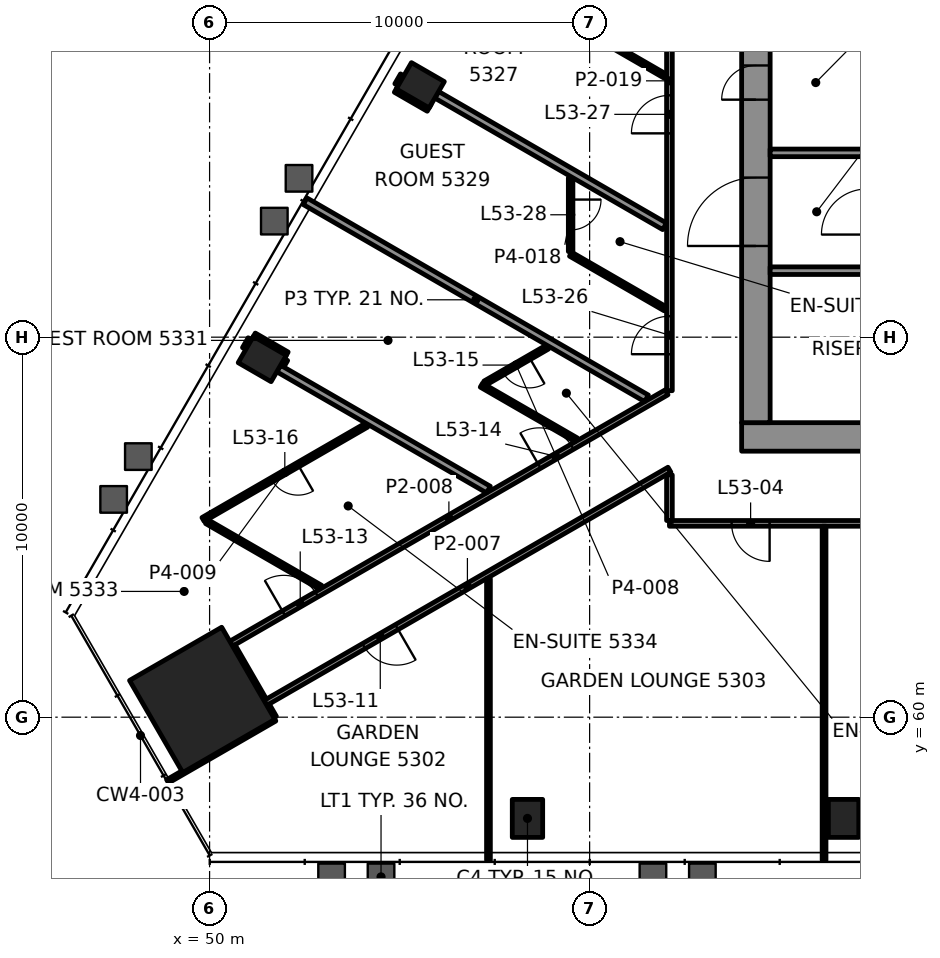
"""IFC4 building model, lengths in metres.
Left out: names, types, materials, properties, quantities, classifications, styles, units other than length and angle.
Written with IfcOpenShell. Run it as: python <this file> out.ifc"""

import sys

from ifc_helpers import new_model, si_unit, direction, frame, frame_2d, origin, origin_2d, place, context, subcontext, project, spatial, rectangle, hollow_rectangle, extrude, element, fill, save


model = new_model("IFC4")
c1 = context("Model", 3, precision=1e-05, world=origin(), true_north=direction((0.0, 1.0)))
c2 = subcontext(c1, "Body", "Model", "MODEL_VIEW")
j1 = project(units=[si_unit("LENGTHUNIT", "METRE"), si_unit("PLANEANGLEUNIT", "RADIAN")], contexts=[c1])
p1 = place(None, origin())
s1 = spatial("IfcSite", under=j1, at=p1, CompositionType="ELEMENT")
p2 = place(p1, origin())
s2 = spatial("IfcBuilding", under=s1, at=p2, CompositionType="ELEMENT")
p3 = place(p2, frame((0.0, 0.0, 226.0)))
s3 = spatial("IfcBuildingStorey", under=s2, at=p3, CompositionType="ELEMENT", Elevation=226.0)
p4 = place(p3, frame((49.806, 60.454, 0.0), z_axis=(0.0, 0.0, 1.0), x_axis=(0.5, -0.866025403784, 0.0)))
e1 = element("IfcColumn", 1, at=p4, inside=s3, PredefinedType="COLUMN", context=c2, shape_type="SweptSolid", body=[
    extrude(rectangle(XDim=2.8, YDim=2.8, at=origin_2d()), origin(), (0.0, 0.0, 1.0), 3.9),
])
for number, where, z_axis, x_axis in (
    (2, (58.365, 57.337, -0.0), (0.0, 0.0, 1.0), (1.0, 0.0, 0.0)),
    (3, (66.682, 57.337, -0.0), (0.0, 0.0, 1.0), (1.0, 0.0, 0.0)),
    (4, (55.544, 76.628, -0.0), (0.0, 0.0, 1.0), (-0.5, -0.866, 0.0)),
    (5, (51.385, 69.425, -0.0), (0.0, 0.0, 1.0), (-0.5, -0.866, 0.0)),
):
    element("IfcColumn", number, at=place(p3, frame(where, z_axis=z_axis, x_axis=x_axis)), inside=s3, PredefinedType="COLUMN", context=c2, shape_type="SweptSolid", body=[
        extrude(hollow_rectangle(XDim=0.8, YDim=1.0, WallThickness=0.05, at=origin_2d()), origin(), (0.0, 0.0, 1.0), 3.9),
    ])
p5 = place(p3, frame((64.0, 67.375, 0.0), z_axis=(0.0, 0.0, 1.0), x_axis=(1.0, 0.0, 0.0)))
e6 = element("IfcWall", 6, at=p5, inside=s3, PredefinedType="SHEAR", context=c2, shape_type="SweptSolid", body=[
    extrude(rectangle(XDim=22.0, YDim=0.75, at=frame_2d((11.0, 0.0))), origin(), (0.0, 0.0, 1.0), 3.7),
])
p6 = place(p5, frame((3.15, 0.0, 0.0)))
e7 = element("IfcOpeningElement", 7, at=p6, cuts=e6, PredefinedType="OPENING", context=c2, shape_type="SweptSolid", body=[
    extrude(rectangle(XDim=0.9, YDim=2.1, at=frame_2d((0.45, 1.05))), frame((0.0, 0.385, 0.0), z_axis=(0.0, -1.0, 0.0), x_axis=(1.0, 0.0, 0.0)), (0.0, 0.0, 1.0), 0.77),
])
p7 = place(p3, frame((64.375, 67.75, 0.0), z_axis=(0.0, 0.0, 1.0), x_axis=(0.0, 1.0, 0.0)))
e8 = element("IfcWall", 8, at=p7, inside=s3, PredefinedType="SHEAR", context=c2, shape_type="SweptSolid", body=[
    extrude(rectangle(XDim=14.5, YDim=0.75, at=frame_2d((7.25, 0.0))), origin(), (0.0, 0.0, 1.0), 3.7),
])
p8 = place(p7, frame((4.65, 0.0, 0.0)))
e9 = element("IfcOpeningElement", 9, at=p8, cuts=e8, PredefinedType="OPENING", context=c2, shape_type="SweptSolid", body=[
    extrude(rectangle(XDim=1.8, YDim=2.1, at=frame_2d((0.9, 1.05))), frame((0.0, 0.385, 0.0), z_axis=(0.0, -1.0, 0.0), x_axis=(1.0, 0.0, 0.0)), (0.0, 0.0, 1.0), 0.77),
])
p9 = place(p7, frame((8.5, 0.0, 0.0)))
e10 = element("IfcOpeningElement", 10, at=p9, cuts=e8, PredefinedType="OPENING", context=c2, shape_type="SweptSolid", body=[
    extrude(rectangle(XDim=0.9, YDim=2.1, at=frame_2d((0.45, 1.05))), frame((0.0, 0.385, 0.0), z_axis=(0.0, -1.0, 0.0), x_axis=(1.0, 0.0, 0.0)), (0.0, 0.0, 1.0), 0.77),
])
p10 = place(p7, frame((12.2, 0.0, 0.0)))
e11 = element("IfcOpeningElement", 11, at=p10, cuts=e8, PredefinedType="OPENING", context=c2, shape_type="SweptSolid", body=[
    extrude(rectangle(XDim=0.9, YDim=2.1, at=frame_2d((0.45, 1.05))), frame((0.0, 0.385, 0.0), z_axis=(0.0, -1.0, 0.0), x_axis=(1.0, 0.0, 0.0)), (0.0, 0.0, 1.0), 0.77),
])
p11 = place(p3, frame((87.899, 65.1, 0.0), z_axis=(0.0, 0.0, 1.0), x_axis=(-1.0, 0.0, 0.0)))
e12 = element("IfcWall", 12, at=p11, inside=s3, PredefinedType="PARTITIONING", context=c2, shape_type="SweptSolid", body=[
    extrude(rectangle(XDim=25.799, YDim=0.15, at=frame_2d((12.899, 0.0))), origin(), (0.0, 0.0, 1.0), 3.1),
])
p12 = place(p11, frame((1.636, 0.0, 0.0)))
e13 = element("IfcOpeningElement", 13, at=p12, cuts=e12, PredefinedType="OPENING", context=c2, shape_type="SweptSolid", body=[
    extrude(rectangle(XDim=1.0, YDim=2.1, at=frame_2d((0.5, 1.05))), frame((0.0, 0.085, 0.0), z_axis=(0.0, -1.0, 0.0), x_axis=(1.0, 0.0, 0.0)), (0.0, 0.0, 1.0), 0.17),
])
p13 = place(p11, frame((7.984, 0.0, 0.0)))
e14 = element("IfcOpeningElement", 14, at=p13, cuts=e12, PredefinedType="OPENING", context=c2, shape_type="SweptSolid", body=[
    extrude(rectangle(XDim=1.0, YDim=2.1, at=frame_2d((0.5, 1.05))), frame((0.0, 0.085, 0.0), z_axis=(0.0, -1.0, 0.0), x_axis=(1.0, 0.0, 0.0)), (0.0, 0.0, 1.0), 0.17),
])
p14 = place(p11, frame((16.815, 0.0, 0.0)))
e15 = element("IfcOpeningElement", 15, at=p14, cuts=e12, PredefinedType="OPENING", context=c2, shape_type="SweptSolid", body=[
    extrude(rectangle(XDim=1.0, YDim=2.1, at=frame_2d((0.5, 1.05))), frame((0.0, 0.085, 0.0), z_axis=(0.0, -1.0, 0.0), x_axis=(1.0, 0.0, 0.0)), (0.0, 0.0, 1.0), 0.17),
])
p15 = place(p11, frame((23.163, 0.0, 0.0)))
e16 = element("IfcOpeningElement", 16, at=p15, cuts=e12, PredefinedType="OPENING", context=c2, shape_type="SweptSolid", body=[
    extrude(rectangle(XDim=1.0, YDim=2.1, at=frame_2d((0.5, 1.05))), frame((0.0, 0.085, 0.0), z_axis=(0.0, -1.0, 0.0), x_axis=(1.0, 0.0, 0.0)), (0.0, 0.0, 1.0), 0.17),
])
p16 = place(p3, frame((48.895, 58.312, 0.0), z_axis=(0.0, 0.0, 1.0), x_axis=(0.866035906198, 0.499981808845, 0.0)))
e17 = element("IfcWall", 17, at=p16, inside=s3, PredefinedType="PARTITIONING", context=c2, shape_type="SweptSolid", body=[
    extrude(rectangle(XDim=3.259, YDim=0.1, at=frame_2d((1.63, 0.0))), origin(), (0.0, 0.0, 1.0), 3.1),
])
p17 = place(p3, frame((62.1, 66.513, 0.0), z_axis=(0.0, 0.0, 1.0), x_axis=(-0.866027942666, -0.499995602502, 0.0)))
e18 = element("IfcWall", 18, at=p17, inside=s3, PredefinedType="PARTITIONING", context=c2, shape_type="SweptSolid", body=[
    extrude(rectangle(XDim=12.276, YDim=0.15, at=frame_2d((6.138, 0.0))), origin(), (0.0, 0.0, 1.0), 2.947),
])
p18 = place(p17, frame((8.286, 0.0, 0.0)))
e19 = element("IfcOpeningElement", 19, at=p18, cuts=e18, PredefinedType="OPENING", context=c2, shape_type="SweptSolid", body=[
    extrude(rectangle(XDim=1.0, YDim=2.1, at=frame_2d((0.5, 1.05))), frame((0.0, 0.085, 0.0), z_axis=(0.0, -1.0, 0.0), x_axis=(1.0, 0.0, 0.0)), (0.0, 0.0, 1.0), 0.17),
])
p19 = place(p3, frame((50.569, 61.934, 0.0), z_axis=(0.0, 0.0, 1.0), x_axis=(0.866030071145, 0.499991915808, 0.0)))
e20 = element("IfcWall", 20, at=p19, inside=s3, PredefinedType="PARTITIONING", context=c2, shape_type="SweptSolid", body=[
    extrude(rectangle(XDim=13.228, YDim=0.15, at=frame_2d((6.614, 0.0))), origin(), (0.0, 0.0, 1.0), 3.1),
])
p20 = place(p19, frame((1.597, 0.0, 0.0)))
e21 = element("IfcOpeningElement", 21, at=p20, cuts=e20, PredefinedType="OPENING", context=c2, shape_type="SweptSolid", body=[
    extrude(rectangle(XDim=1.0, YDim=2.1, at=frame_2d((0.5, 1.05))), frame((0.0, 0.085, 0.0), z_axis=(0.0, -1.0, 0.0), x_axis=(1.0, 0.0, 0.0)), (0.0, 0.0, 1.0), 0.17),
])
p21 = place(p19, frame((9.36, 0.0, 0.0)))
e22 = element("IfcOpeningElement", 22, at=p21, cuts=e20, PredefinedType="OPENING", context=c2, shape_type="SweptSolid", body=[
    extrude(rectangle(XDim=1.0, YDim=2.1, at=frame_2d((0.5, 1.05))), frame((0.0, 0.085, 0.0), z_axis=(0.0, -1.0, 0.0), x_axis=(1.0, 0.0, 0.0)), (0.0, 0.0, 1.0), 0.17),
])
p22 = place(p3, frame((58.889, 69.74, 0.0), z_axis=(0.0, 0.0, 1.0), x_axis=(-0.866039783157, -0.499975093369, 0.0)))
e23 = element("IfcWall", 23, at=p22, inside=s3, PredefinedType="PARTITIONING", context=c2, shape_type="SweptSolid", body=[
    extrude(rectangle(XDim=1.896, YDim=0.12, at=frame_2d((0.948, 0.0))), origin(), (0.0, 0.0, 1.0), 3.1),
])
p23 = place(p22, frame((0.548, 0.0, 0.0)))
e24 = element("IfcOpeningElement", 24, at=p23, cuts=e23, PredefinedType="OPENING", context=c2, shape_type="SweptSolid", body=[
    extrude(rectangle(XDim=0.8, YDim=2.1, at=frame_2d((0.4, 1.05))), frame((0.0, 0.07, 0.0), z_axis=(0.0, -1.0, 0.0), x_axis=(1.0, 0.0, 0.0)), (0.0, 0.0, 1.0), 0.14),
])
p24 = place(p3, frame((54.13, 67.685, 0.0), z_axis=(0.0, 0.0, 1.0), x_axis=(-0.866020232408, -0.500008956979, 0.0)))
e25 = element("IfcWall", 25, at=p24, inside=s3, PredefinedType="PARTITIONING", context=c2, shape_type="SweptSolid", body=[
    extrude(rectangle(XDim=4.967, YDim=0.12, at=frame_2d((2.483, 0.0))), origin(), (0.0, 0.0, 1.0), 3.1),
])
p25 = place(p24, frame((2.083, 0.0, 0.0)))
e26 = element("IfcOpeningElement", 26, at=p25, cuts=e25, PredefinedType="OPENING", context=c2, shape_type="SweptSolid", body=[
    extrude(rectangle(XDim=0.8, YDim=2.1, at=frame_2d((0.4, 1.05))), frame((0.0, 0.07, 0.0), z_axis=(0.0, -1.0, 0.0), x_axis=(1.0, 0.0, 0.0)), (0.0, 0.0, 1.0), 0.14),
])
p26 = place(p3, frame((51.868, 69.262, 0.0), z_axis=(0.0, 0.0, 1.0), x_axis=(0.500359323436, 0.865817848887, 0.0)))
e27 = element("IfcWall", 27, at=p26, inside=s3, PredefinedType="PARTITIONING", context=c2, shape_type="SweptSolid", body=[
    extrude(rectangle(XDim=0.199, YDim=0.2, at=frame_2d((0.1, 0.0))), origin(), (0.0, 0.0, 1.0), 3.1),
])
p27 = place(p3, frame((50.952, 69.676, 0.0), z_axis=(0.0, 0.0, 1.0), x_axis=(0.500264001326, 0.865872928886, 0.0)))
e28 = element("IfcWall", 28, at=p27, inside=s3, PredefinedType="PARTITIONING", context=c2, shape_type="SweptSolid", body=[
    extrude(rectangle(XDim=0.299, YDim=0.2, at=frame_2d((0.149, 0.0))), origin(), (0.0, 0.0, 1.0), 3.1),
])
p28 = place(p3, frame((54.961, 76.619, 0.0), z_axis=(0.0, 0.0, 1.0), x_axis=(0.500426713919, 0.865778900179, 0.0)))
e29 = element("IfcWall", 29, at=p28, inside=s3, PredefinedType="PARTITIONING", context=c2, shape_type="SweptSolid", body=[
    extrude(rectangle(XDim=0.3, YDim=0.2, at=frame_2d((0.15, 0.0))), origin(), (0.0, 0.0, 1.0), 3.1),
])
p29 = place(p3, frame((66.169, 56.237, 0.0), z_axis=(0.0, 0.0, 1.0), x_axis=(0.0, 1.0, 0.0)))
e30 = element("IfcWall", 30, at=p29, inside=s3, PredefinedType="PARTITIONING", context=c2, shape_type="SweptSolid", body=[
    extrude(rectangle(XDim=8.788, YDim=0.1, at=frame_2d((4.394, 0.0))), origin(), (0.0, 0.0, 1.0), 3.022),
])
p30 = place(p3, frame((62.1, 65.176, 0.0), z_axis=(0.0, 0.0, 1.0), x_axis=(0.0, 1.0, 0.0)))
e31 = element("IfcWall", 31, at=p30, inside=s3, PredefinedType="PARTITIONING", context=c2, shape_type="SweptSolid", body=[
    extrude(rectangle(XDim=1.201, YDim=0.15, at=frame_2d((0.6, 0.0))), origin(), (0.0, 0.0, 1.0), 2.947),
])
p31 = place(p3, frame((62.1, 68.591, 0.0), z_axis=(0.0, 0.0, 1.0), x_axis=(0.0, 1.0, 0.0)))
e32 = element("IfcWall", 32, at=p31, inside=s3, PredefinedType="PARTITIONING", context=c2, shape_type="SweptSolid", body=[
    extrude(rectangle(XDim=16.308, YDim=0.15, at=frame_2d((8.154, 0.0))), origin(), (0.0, 0.0, 1.0), 3.1),
])
p32 = place(p31, frame((0.96, 0.0, 0.0)))
e33 = element("IfcOpeningElement", 33, at=p32, cuts=e32, PredefinedType="OPENING", context=c2, shape_type="SweptSolid", body=[
    extrude(rectangle(XDim=1.0, YDim=2.1, at=frame_2d((0.5, 1.05))), frame((0.0, 0.085, 0.0), z_axis=(0.0, -1.0, 0.0), x_axis=(1.0, 0.0, 0.0)), (0.0, 0.0, 1.0), 0.17),
])
p33 = place(p31, frame((6.772, 0.0, 0.0)))
e34 = element("IfcOpeningElement", 34, at=p33, cuts=e32, PredefinedType="OPENING", context=c2, shape_type="SweptSolid", body=[
    extrude(rectangle(XDim=1.0, YDim=2.1, at=frame_2d((0.5, 1.05))), frame((0.0, 0.085, 0.0), z_axis=(0.0, -1.0, 0.0), x_axis=(1.0, 0.0, 0.0)), (0.0, 0.0, 1.0), 0.17),
])
p34 = place(p3, frame((59.5, 74.189, 0.0), z_axis=(0.0, 0.0, 1.0), x_axis=(0.0, -1.0, 0.0)))
e35 = element("IfcWall", 35, at=p34, inside=s3, PredefinedType="PARTITIONING", context=c2, shape_type="SweptSolid", body=[
    extrude(rectangle(XDim=1.936, YDim=0.12, at=frame_2d((0.968, 0.0))), origin(), (0.0, 0.0, 1.0), 3.1),
])
p35 = place(p34, frame((0.568, 0.0, 0.0)))
e36 = element("IfcOpeningElement", 36, at=p35, cuts=e35, PredefinedType="OPENING", context=c2, shape_type="SweptSolid", body=[
    extrude(rectangle(XDim=0.8, YDim=2.1, at=frame_2d((0.4, 1.05))), frame((0.0, 0.07, 0.0), z_axis=(0.0, -1.0, 0.0), x_axis=(1.0, 0.0, 0.0)), (0.0, 0.0, 1.0), 0.14),
])
p36 = place(p3, frame((57.338, 56.237, 0.0), z_axis=(0.0, 0.0, 1.0), x_axis=(0.0, 1.0, 0.0)))
e37 = element("IfcWall", 37, at=p36, inside=s3, PredefinedType="PARTITIONING", context=c2, shape_type="SweptSolid", body=[
    extrude(rectangle(XDim=7.41, YDim=0.1, at=frame_2d((3.705, 0.0))), origin(), (0.0, 0.0, 1.0), 3.1),
])
p37 = place(p3, frame((51.693, 59.985, 0.0), z_axis=(0.0, 0.0, 1.0), x_axis=(-0.499854089722, 0.866109628736, 0.0)))
e38 = element("IfcWall", 38, at=p37, inside=s3, PredefinedType="PARTITIONING", context=c2, shape_type="SweptSolid", body=[
    extrude(rectangle(XDim=0.375, YDim=0.15, at=frame_2d((0.187, 0.0))), origin(), (0.0, 0.0, 1.0), 3.1),
])
p38 = place(p3, frame((61.99, 76.868, 0.0), z_axis=(0.0, 0.0, 1.0), x_axis=(-0.866028357664, 0.499994883695, 0.0)))
e39 = element("IfcWall", 39, at=p38, inside=s3, PredefinedType="PARTITIONING", context=c2, shape_type="SweptSolid", body=[
    extrude(rectangle(XDim=3.568, YDim=0.12, at=frame_2d((1.784, 0.0))), origin(), (0.0, 0.0, 1.0), 3.1),
])
p39 = place(p3, frame((61.973, 72.917, 0.0), z_axis=(0.0, 0.0, 1.0), x_axis=(-0.866027621823, 0.499996158224, 0.0)))
e40 = element("IfcWall", 40, at=p39, inside=s3, PredefinedType="PARTITIONING", context=c2, shape_type="SweptSolid", body=[
    extrude(rectangle(XDim=6.923, YDim=0.2, at=frame_2d((3.462, 0.0))), origin(), (0.0, 0.0, 1.0), 3.1),
])
p40 = place(p3, frame((55.777, 76.032, 0.0), z_axis=(0.0, 0.0, 1.0), x_axis=(-0.866010750942, 0.50002537861, 0.0)))
e41 = element("IfcWall", 41, at=p40, inside=s3, PredefinedType="PARTITIONING", context=c2, shape_type="SweptSolid", body=[
    extrude(rectangle(XDim=1.0, YDim=0.2, at=frame_2d((0.5, 0.0))), origin(), (0.0, 0.0, 1.0), 3.022),
])
p41 = place(p3, frame((61.99, 70.746, 0.0), z_axis=(0.0, 0.0, 1.0), x_axis=(-0.86600886466, 0.50002864551, 0.0)))
e42 = element("IfcWall", 42, at=p41, inside=s3, PredefinedType="PARTITIONING", context=c2, shape_type="SweptSolid", body=[
    extrude(rectangle(XDim=2.876, YDim=0.12, at=frame_2d((1.438, 0.0))), origin(), (0.0, 0.0, 1.0), 3.1),
])
p42 = place(p3, frame((61.497, 68.39, 0.0), z_axis=(0.0, 0.0, 1.0), x_axis=(-0.866030396021, 0.499991353094, 0.0)))
e43 = element("IfcWall", 43, at=p42, inside=s3, PredefinedType="PARTITIONING", context=c2, shape_type="SweptSolid", body=[
    extrude(rectangle(XDim=10.374, YDim=0.2, at=frame_2d((5.187, 0.0))), origin(), (0.0, 0.0, 1.0), 3.022),
])
p43 = place(p3, frame((59.643, 67.299, 0.0), z_axis=(0.0, 0.0, 1.0), x_axis=(-0.86600886466, 0.50002864551, 0.0)))
e44 = element("IfcWall", 44, at=p43, inside=s3, PredefinedType="PARTITIONING", context=c2, shape_type="SweptSolid", body=[
    extrude(rectangle(XDim=2.876, YDim=0.12, at=frame_2d((1.438, 0.0))), origin(), (0.0, 0.0, 1.0), 3.1),
])
p44 = place(p3, frame((52.018, 69.522, 0.0), z_axis=(0.0, 0.0, 1.0), x_axis=(-0.86597798544, 0.50008212199, 0.0)))
e45 = element("IfcWall", 45, at=p44, inside=s3, PredefinedType="PARTITIONING", context=c2, shape_type="SweptSolid", body=[
    extrude(rectangle(XDim=0.999, YDim=0.2, at=frame_2d((0.5, 0.0))), origin(), (0.0, 0.0, 1.0), 3.022),
])
p45 = place(p3, frame((57.338, 65.989, 0.0), z_axis=(0.0, 0.0, 1.0), x_axis=(-0.866008861407, 0.500028651143, 0.0)))
e46 = element("IfcWall", 46, at=p45, inside=s3, PredefinedType="PARTITIONING", context=c2, shape_type="SweptSolid", body=[
    extrude(rectangle(XDim=6.373, YDim=0.2, at=frame_2d((3.187, 0.0))), origin(), (0.0, 0.0, 1.0), 3.1),
])
p46 = place(p3, frame((52.919, 63.418, 0.0), z_axis=(0.0, 0.0, 1.0), x_axis=(-0.866045730533, 0.499964791386, 0.0)))
e47 = element("IfcWall", 47, at=p46, inside=s3, PredefinedType="PARTITIONING", context=c2, shape_type="SweptSolid", body=[
    extrude(rectangle(XDim=3.459, YDim=0.12, at=frame_2d((1.729, 0.0))), origin(), (0.0, 0.0, 1.0), 3.1),
])
p47 = place(p3, frame((51.431, 60.44, 0.0), z_axis=(0.0, 0.0, 1.0), x_axis=(-0.499991515992, 0.866030301974, 0.0)))
e48 = element("IfcWall", 48, at=p47, inside=s3, PredefinedType="PARTITIONING", context=c2, shape_type="SweptSolid", body=[
    extrude(rectangle(XDim=1.649, YDim=0.15, at=frame_2d((0.825, 0.0))), origin(), (0.0, 0.0, 1.0), 2.947),
])
p48 = place(p3, frame((64.75, 71.75, 0.0), z_axis=(0.0, 0.0, 1.0), x_axis=(1.0, 0.0, 0.0)))
e49 = element("IfcWall", 49, at=p48, inside=s3, PredefinedType="PARTITIONING", context=c2, shape_type="SweptSolid", body=[
    extrude(rectangle(XDim=5.55, YDim=0.2, at=frame_2d((2.775, 0.0))), origin(), (0.0, 0.0, 1.0), 3.7),
])
p49 = place(p3, frame((64.75, 74.85, 0.0), z_axis=(0.0, 0.0, 1.0), x_axis=(1.0, 0.0, 0.0)))
e50 = element("IfcWall", 50, at=p49, inside=s3, PredefinedType="PARTITIONING", context=c2, shape_type="SweptSolid", body=[
    extrude(rectangle(XDim=2.45, YDim=0.2, at=frame_2d((1.225, 0.0))), origin(), (0.0, 0.0, 1.0), 3.7),
])
p50 = place(p15, origin())
e51 = element("IfcDoor", 51, at=p50, inside=s3, OperationType="SINGLE_SWING_LEFT", PredefinedType="DOOR", context=c2, shape_type="SweptSolid", body=[
    extrude(rectangle(XDim=1.0, YDim=2.1, at=frame_2d((0.5, 1.05))), frame((0.0, 0.025, 0.0), z_axis=(0.0, -1.0, 0.0), x_axis=(1.0, 0.0, 0.0)), (0.0, 0.0, 1.0), 0.05),
])
fill(e16, e51)
p51 = place(p18, origin())
e52 = element("IfcDoor", 52, at=p51, inside=s3, OperationType="SINGLE_SWING_RIGHT", PredefinedType="DOOR", context=c2, shape_type="SweptSolid", body=[
    extrude(rectangle(XDim=1.0, YDim=2.1, at=frame_2d((0.5, 1.05))), frame((0.0, 0.025, 0.0), z_axis=(0.0, -1.0, 0.0), x_axis=(1.0, 0.0, 0.0)), (0.0, 0.0, 1.0), 0.05),
])
fill(e19, e52)
p52 = place(p20, origin())
e53 = element("IfcDoor", 53, at=p52, inside=s3, OperationType="SINGLE_SWING_RIGHT", PredefinedType="DOOR", context=c2, shape_type="SweptSolid", body=[
    extrude(rectangle(XDim=1.0, YDim=2.1, at=frame_2d((0.5, 1.05))), frame((0.0, 0.025, 0.0), z_axis=(0.0, -1.0, 0.0), x_axis=(1.0, 0.0, 0.0)), (0.0, 0.0, 1.0), 0.05),
])
fill(e21, e53)
p53 = place(p21, origin())
e54 = element("IfcDoor", 54, at=p53, inside=s3, OperationType="SINGLE_SWING_RIGHT", PredefinedType="DOOR", context=c2, shape_type="SweptSolid", body=[
    extrude(rectangle(XDim=1.0, YDim=2.1, at=frame_2d((0.5, 1.05))), frame((0.0, 0.025, 0.0), z_axis=(0.0, -1.0, 0.0), x_axis=(1.0, 0.0, 0.0)), (0.0, 0.0, 1.0), 0.05),
])
fill(e22, e54)
p54 = place(p23, origin())
e55 = element("IfcDoor", 55, at=p54, inside=s3, OperationType="SINGLE_SWING_RIGHT", PredefinedType="DOOR", context=c2, shape_type="SweptSolid", body=[
    extrude(rectangle(XDim=0.8, YDim=2.1, at=frame_2d((0.4, 1.05))), frame((0.0, 0.025, 0.0), z_axis=(0.0, -1.0, 0.0), x_axis=(1.0, 0.0, 0.0)), (0.0, 0.0, 1.0), 0.05),
])
fill(e24, e55)
p55 = place(p25, origin())
e56 = element("IfcDoor", 56, at=p55, inside=s3, OperationType="SINGLE_SWING_RIGHT", PredefinedType="DOOR", context=c2, shape_type="SweptSolid", body=[
    extrude(rectangle(XDim=0.8, YDim=2.1, at=frame_2d((0.4, 1.05))), frame((0.0, 0.025, 0.0), z_axis=(0.0, -1.0, 0.0), x_axis=(1.0, 0.0, 0.0)), (0.0, 0.0, 1.0), 0.05),
])
fill(e26, e56)
p56 = place(p32, origin())
e57 = element("IfcDoor", 57, at=p56, inside=s3, OperationType="SINGLE_SWING_RIGHT", PredefinedType="DOOR", context=c2, shape_type="SweptSolid", body=[
    extrude(rectangle(XDim=1.0, YDim=2.1, at=frame_2d((0.5, 1.05))), frame((0.0, 0.025, 0.0), z_axis=(0.0, -1.0, 0.0), x_axis=(1.0, 0.0, 0.0)), (0.0, 0.0, 1.0), 0.05),
])
fill(e33, e57)
p57 = place(p33, origin())
e58 = element("IfcDoor", 58, at=p57, inside=s3, OperationType="SINGLE_SWING_RIGHT", PredefinedType="DOOR", context=c2, shape_type="SweptSolid", body=[
    extrude(rectangle(XDim=1.0, YDim=2.1, at=frame_2d((0.5, 1.05))), frame((0.0, 0.025, 0.0), z_axis=(0.0, -1.0, 0.0), x_axis=(1.0, 0.0, 0.0)), (0.0, 0.0, 1.0), 0.05),
])
fill(e34, e58)
p58 = place(p35, origin())
e59 = element("IfcDoor", 59, at=p58, inside=s3, OperationType="SINGLE_SWING_RIGHT", PredefinedType="DOOR", context=c2, shape_type="SweptSolid", body=[
    extrude(rectangle(XDim=0.8, YDim=2.1, at=frame_2d((0.4, 1.05))), frame((0.0, 0.025, 0.0), z_axis=(0.0, -1.0, 0.0), x_axis=(1.0, 0.0, 0.0)), (0.0, 0.0, 1.0), 0.05),
])
fill(e36, e59)
p59 = place(p8, origin())
e60 = element("IfcDoor", 60, at=p59, inside=s3, OperationType="SINGLE_SWING_LEFT", PredefinedType="DOOR", context=c2, shape_type="SweptSolid", body=[
    extrude(rectangle(XDim=1.8, YDim=2.1, at=frame_2d((0.9, 1.05))), frame((0.0, 0.095, 0.0), z_axis=(0.0, -1.0, 0.0), x_axis=(1.0, 0.0, 0.0)), (0.0, 0.0, 1.0), 0.19),
])
fill(e9, e60)
p60 = place(p9, origin())
e61 = element("IfcDoor", 61, at=p60, inside=s3, OperationType="SINGLE_SWING_RIGHT", PredefinedType="DOOR", context=c2, shape_type="SweptSolid", body=[
    extrude(rectangle(XDim=0.9, YDim=2.1, at=frame_2d((0.45, 1.05))), frame((0.0, 0.095, 0.0), z_axis=(0.0, -1.0, 0.0), x_axis=(1.0, 0.0, 0.0)), (0.0, 0.0, 1.0), 0.19),
])
fill(e10, e61)
save(model, sys.argv[1])
